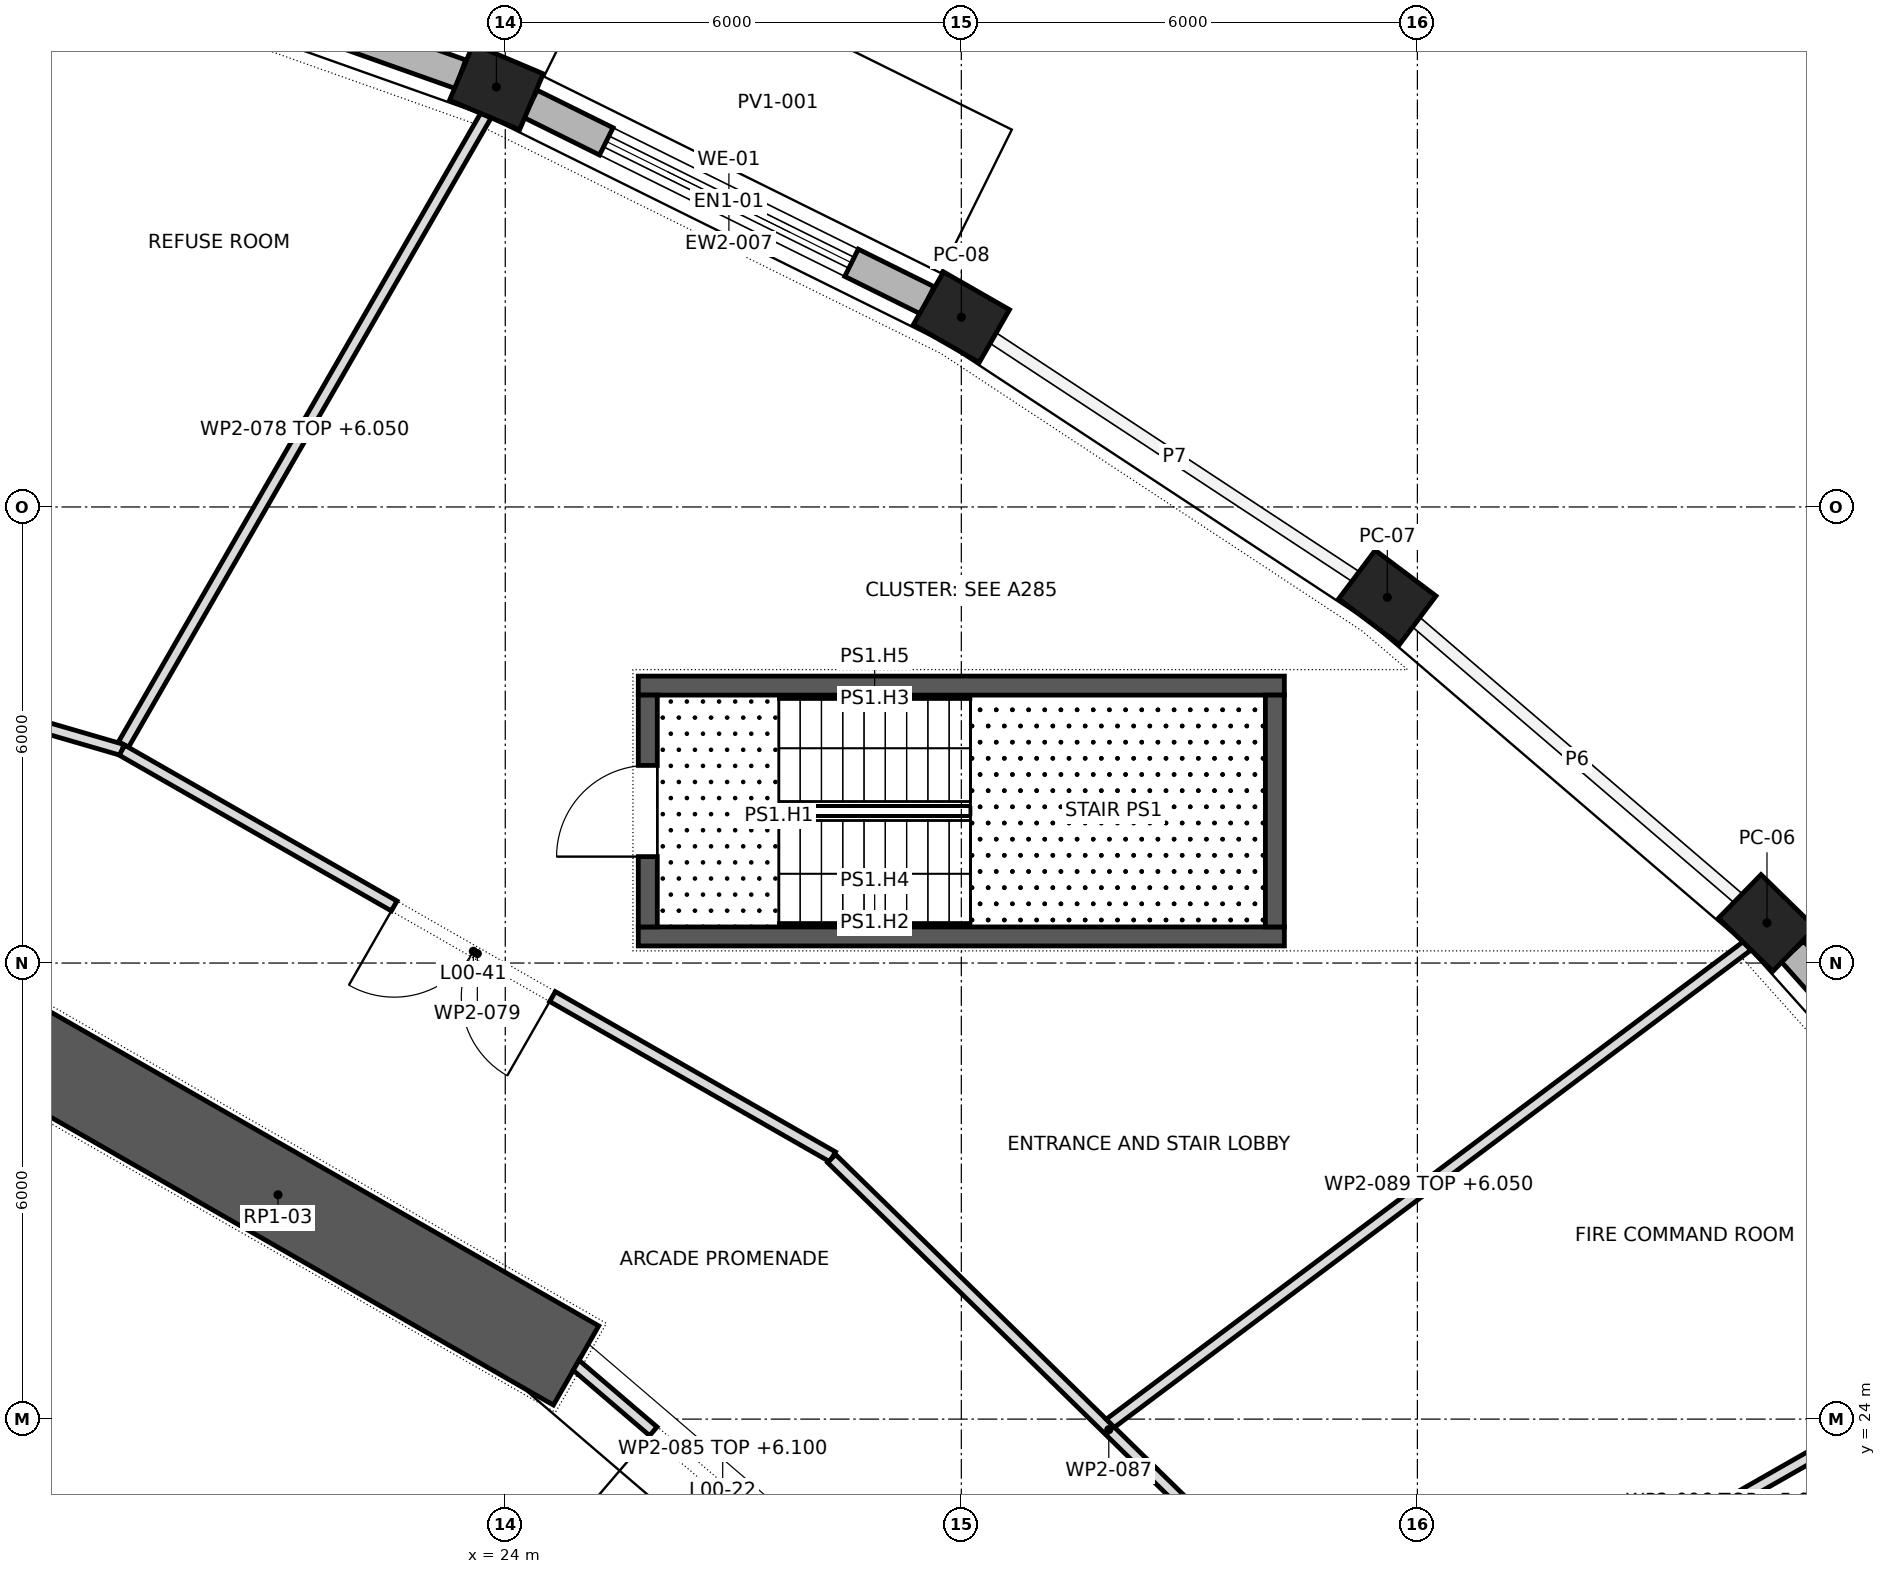
"""IFC4 building model, lengths in metres.
Left out: names, types, materials, properties, quantities, classifications, styles, units other than length and angle.
Written with IfcOpenShell. Run it as: python <this file> out.ifc"""

import sys

from ifc_helpers import new_model, si_unit, direction, frame, frame_2d, origin, origin_2d, place, context, subcontext, project, spatial, polyline, rectangle, outline, extrude, element, fill, save


model = new_model("IFC4")
c1 = context("Model", 3, precision=1e-05, world=origin(), true_north=direction((0.0, 1.0)))
c2 = subcontext(c1, "Body", "Model", "MODEL_VIEW")
j1 = project(units=[si_unit("LENGTHUNIT", "METRE"), si_unit("PLANEANGLEUNIT", "RADIAN")], contexts=[c1])
p1 = place(None, origin())
s1 = spatial("IfcSite", under=j1, at=p1, CompositionType="ELEMENT")
p2 = place(p1, origin())
s2 = spatial("IfcBuilding", under=s1, at=p2, CompositionType="ELEMENT")
p3 = place(p2, origin())
s3 = spatial("IfcBuildingStorey", under=s2, at=p3, CompositionType="ELEMENT", Elevation=0.0)
for number, where, z_axis, x_axis in (
    (1, (40.599, 30.528, 0.0), (0.0, 0.0, 1.0), (-0.715, 0.699, 0.0)),
    (2, (35.605, 34.81, 0.0), (0.0, 0.0, 1.0), (-0.799, 0.601, 0.0)),
    (3, (30.001, 38.497, 0.0), (0.0, 0.0, 1.0), (-0.868, 0.497, 0.0)),
    (4, (23.884, 41.525, 0.0), (0.0, 0.0, 1.0), (-0.921, 0.389, 0.0)),
):
    element("IfcColumn", number, at=place(p3, frame(where, z_axis=z_axis, x_axis=x_axis)), inside=s3, PredefinedType="COLUMN", context=c2, shape_type="SweptSolid", body=[
        extrude(rectangle(XDim=1.0, YDim=0.8, at=origin_2d()), origin(), (0.0, 0.0, 1.0), 7.0),
    ])
p4 = place(p3, frame((24.931, 24.706, 0.0), z_axis=(0.0, 0.0, 1.0), x_axis=(-0.867760656864, 0.496982336103, 0.0)))
e5 = element("IfcWall", 5, at=p4, inside=s3, PredefinedType="SHEAR", context=c2, shape_type="SweptSolid", body=[
    extrude(rectangle(XDim=9.038, YDim=1.2, at=frame_2d((4.519, 0.0))), origin(), (0.0, 0.0, 1.0), 7.0),
])
p5 = place(p3, frame((44.566, 26.095, 0.0), z_axis=(0.0, 0.0, 1.0), x_axis=(-0.666902265084, 0.745145199827, 0.0)))
e6 = element("IfcWall", 6, at=p5, inside=s3, PredefinedType="STANDARD", context=c2, shape_type="SweptSolid", body=[
    extrude(rectangle(XDim=5.448, YDim=0.4, at=frame_2d((2.724, 0.0))), origin(), (0.0, 0.0, 1.0), 6.2),
])
p6 = place(p5, frame((2.124, 0.0, 0.0)))
e7 = element("IfcOpeningElement", 7, at=p6, cuts=e6, PredefinedType="OPENING", context=c2, shape_type="SweptSolid", body=[
    extrude(rectangle(XDim=1.2, YDim=2.4, at=frame_2d((0.6, 1.2))), frame((0.0, 0.212, 0.0), z_axis=(0.0, -1.0, 0.0), x_axis=(1.0, 0.0, 0.0)), (0.0, 0.0, 1.0), 0.424),
])
p7 = place(p3, frame((29.553, 38.719, 0.0), z_axis=(0.0, 0.0, 1.0), x_axis=(-0.896188687727, 0.443673118399, 0.0)))
e8 = element("IfcWall", 8, at=p7, inside=s3, PredefinedType="STANDARD", context=c2, shape_type="SweptSolid", body=[
    extrude(rectangle(XDim=5.826, YDim=0.4, at=frame_2d((2.913, 0.0))), origin(), (0.0, 0.0, 1.0), 6.2),
])
p8 = place(p7, frame((1.113, 0.0, 0.0)))
e9 = element("IfcOpeningElement", 9, at=p8, cuts=e8, PredefinedType="OPENING", context=c2, shape_type="SweptSolid", body=[
    extrude(rectangle(XDim=3.6, YDim=3.0, at=frame_2d((1.8, 1.5))), frame((0.0, 0.212, 0.0), z_axis=(0.0, -1.0, 0.0), x_axis=(1.0, 0.0, 0.0)), (0.0, 0.0, 1.0), 0.424),
])
p9 = place(p7, frame((1.113, 0.0, 3.45)))
e10 = element("IfcOpeningElement", 10, at=p9, cuts=e8, PredefinedType="OPENING", context=c2, shape_type="SweptSolid", body=[
    extrude(rectangle(XDim=3.6, YDim=2.25, at=frame_2d((1.8, 1.125))), frame((0.0, 0.212, 0.0), z_axis=(0.0, -1.0, 0.0), x_axis=(1.0, 0.0, 0.0)), (0.0, 0.0, 1.0), 0.424),
])
p10 = place(p3, frame((23.412, 41.692, 0.0), z_axis=(0.0, 0.0, 1.0), x_axis=(-0.942325911458, 0.334696693431, 0.0)))
e11 = element("IfcWall", 11, at=p10, inside=s3, PredefinedType="STANDARD", context=c2, shape_type="SweptSolid", body=[
    extrude(rectangle(XDim=5.925, YDim=0.4, at=frame_2d((2.963, 0.0))), origin(), (0.0, 0.0, 1.0), 6.2),
])
p11 = place(p10, frame((2.363, 0.0, 0.0)))
e12 = element("IfcOpeningElement", 12, at=p11, cuts=e11, PredefinedType="OPENING", context=c2, shape_type="SweptSolid", body=[
    extrude(rectangle(XDim=1.2, YDim=2.4, at=frame_2d((0.6, 1.2))), frame((0.0, 0.212, 0.0), z_axis=(0.0, -1.0, 0.0), x_axis=(1.0, 0.0, 0.0)), (0.0, 0.0, 1.0), 0.424),
])
for number, where, z_axis, x_axis in (
    (13, (25.75, 33.65, 0.0), (0.0, 0.0, 1.0), (1.0, 0.0, 0.0)),
    (14, (25.75, 30.35, 0.0), (0.0, 0.0, 1.0), (1.0, 0.0, 0.0)),
):
    element("IfcWall", number, at=place(p3, frame(where, z_axis=z_axis, x_axis=x_axis)), inside=s3, PredefinedType="SHEAR", context=c2, shape_type="SweptSolid", body=[
        extrude(rectangle(XDim=8.5, YDim=0.25, at=frame_2d((4.25, 0.0))), origin(), (0.0, 0.0, 1.0), 6.65),
    ])
p12 = place(p3, frame((25.875, 30.475, 0.0), z_axis=(0.0, 0.0, 1.0), x_axis=(0.0, 1.0, 0.0)))
e15 = element("IfcWall", 15, at=p12, inside=s3, PredefinedType="SHEAR", context=c2, shape_type="SweptSolid", body=[
    extrude(rectangle(XDim=3.05, YDim=0.25, at=frame_2d((1.525, 0.0))), origin(), (0.0, 0.0, 1.0), 6.65),
])
p13 = place(p12, frame((0.925, 0.0, 0.0)))
e16 = element("IfcOpeningElement", 16, at=p13, cuts=e15, PredefinedType="OPENING", context=c2, shape_type="SweptSolid", body=[
    extrude(rectangle(XDim=1.2, YDim=2.1, at=frame_2d((0.6, 1.05))), frame((0.0, 0.137, 0.0), z_axis=(0.0, -1.0, 0.0), x_axis=(1.0, 0.0, 0.0)), (0.0, 0.0, 1.0), 0.274),
])
p14 = place(p3, frame((34.125, 30.475, 0.0), z_axis=(0.0, 0.0, 1.0), x_axis=(0.0, 1.0, 0.0)))
e17 = element("IfcWall", 17, at=p14, inside=s3, PredefinedType="SHEAR", context=c2, shape_type="SweptSolid", body=[
    extrude(rectangle(XDim=3.05, YDim=0.25, at=frame_2d((1.525, 0.0))), origin(), (0.0, 0.0, 1.0), 6.65),
])
p15 = place(p3, frame((8.446, 35.862, 0.0), z_axis=(0.0, 0.0, 1.0), x_axis=(0.96020899529, -0.27928244729, 0.0)))
e18 = element("IfcWall", 18, at=p15, inside=s3, PredefinedType="PARTITIONING", context=c2, shape_type="SweptSolid", body=[
    extrude(rectangle(XDim=10.95, YDim=0.15, at=frame_2d((5.475, 0.0))), origin(), (0.0, 0.0, 1.0), 6.65),
])
p16 = place(p15, frame((7.655, 0.0, 0.0)))
e19 = element("IfcOpeningElement", 19, at=p16, cuts=e18, PredefinedType="OPENING", context=c2, shape_type="SweptSolid", body=[
    extrude(rectangle(XDim=1.0, YDim=2.1, at=frame_2d((0.5, 1.05))), frame((0.0, 0.087, 0.0), z_axis=(0.0, -1.0, 0.0), x_axis=(1.0, 0.0, 0.0)), (0.0, 0.0, 1.0), 0.174),
])
p17 = place(p3, frame((18.978, 32.876, 0.0), z_axis=(0.0, 0.0, 1.0), x_axis=(0.499216965882, 0.866477016992, 0.0)))
e20 = element("IfcWall", 20, at=p17, inside=s3, PredefinedType="PARTITIONING", context=c2, shape_type="SweptSolid", body=[
    extrude(outline(polyline([(0.0, -0.075), (9.558, -0.075), (9.539, 0.075), (0.0, 0.075), (0.0, -0.075)])), origin(), (0.0, 0.0, 1.0), 6.05),
])
p18 = place(p3, frame((18.958, 32.8, 0.0), z_axis=(0.0, 0.0, 1.0), x_axis=(0.867958465669, -0.496636790697, 0.0)))
e21 = element("IfcWall", 21, at=p18, inside=s3, PredefinedType="PARTITIONING", context=c2, shape_type="SweptSolid", body=[
    extrude(rectangle(XDim=10.772, YDim=0.15, at=frame_2d((5.386, 0.0))), origin(), (0.0, 0.0, 1.0), 6.65),
])
p19 = place(p18, frame((4.125, 0.0, 0.0)))
e22 = element("IfcOpeningElement", 22, at=p19, cuts=e21, PredefinedType="OPENING", context=c2, shape_type="SweptSolid", body=[
    extrude(rectangle(XDim=2.4, YDim=2.1, at=frame_2d((1.2, 1.05))), frame((0.0, 0.087, 0.0), z_axis=(0.0, -1.0, 0.0), x_axis=(1.0, 0.0, 0.0)), (0.0, 0.0, 1.0), 0.174),
])
p20 = place(p3, frame((24.932, 24.708, 0.0), z_axis=(0.0, 0.0, 1.0), x_axis=(0.760084552743, -0.649824185978, 0.0)))
e23 = element("IfcWall", 23, at=p20, inside=s3, PredefinedType="PARTITIONING", context=c2, shape_type="SweptSolid", body=[
    extrude(outline(polyline([(0.014, -0.075), (5.06, -0.075), (5.09, 0.075), (-0.014, 0.075), (0.014, -0.075)])), origin(), (0.0, 0.0, 1.0), 6.1),
])
p21 = place(p20, frame((1.337, 0.0, 0.0)))
e24 = element("IfcOpeningElement", 24, at=p21, cuts=e23, PredefinedType="OPENING", context=c2, shape_type="SweptSolid", body=[
    extrude(rectangle(XDim=2.4, YDim=2.1, at=frame_2d((1.2, 1.05))), frame((0.0, 0.087, 0.0), z_axis=(0.0, -1.0, 0.0), x_axis=(1.0, 0.0, 0.0)), (0.0, 0.0, 1.0), 0.174),
])
p22 = place(p3, frame((28.294, 27.428, 0.0), z_axis=(0.0, 0.0, 1.0), x_axis=(0.714841567175, -0.6992864462, 0.0)))
e25 = element("IfcWall", 25, at=p22, inside=s3, PredefinedType="PARTITIONING", context=c2, shape_type="SweptSolid", body=[
    extrude(rectangle(XDim=10.202, YDim=0.15, at=frame_2d((5.101, 0.0))), origin(), (0.0, 0.0, 1.0), 6.65),
])
p23 = place(p22, frame((7.097, 0.0, 0.0)))
e26 = element("IfcOpeningElement", 26, at=p23, cuts=e25, PredefinedType="OPENING", context=c2, shape_type="SweptSolid", body=[
    extrude(rectangle(XDim=1.0, YDim=2.1, at=frame_2d((0.5, 1.05))), frame((0.0, 0.087, 0.0), z_axis=(0.0, -1.0, 0.0), x_axis=(1.0, 0.0, 0.0)), (0.0, 0.0, 1.0), 0.174),
])
p24 = place(p3, frame((31.96, 23.945, 0.0), z_axis=(0.0, 0.0, 1.0), x_axis=(0.800117504973, 0.599843294732, 0.0)))
e27 = element("IfcWall", 27, at=p24, inside=s3, PredefinedType="PARTITIONING", context=c2, shape_type="SweptSolid", body=[
    extrude(outline(polyline([(0.011, -0.075), (10.482, -0.075), (10.459, 0.075), (-0.011, 0.075), (0.011, -0.075)])), origin(), (0.0, 0.0, 1.0), 6.05),
])
p25 = place(p3, frame((35.637, 20.348, 0.0), z_axis=(0.0, 0.0, 1.0), x_axis=(0.868596802664, 0.495519519698, 0.0)))
e28 = element("IfcWall", 28, at=p25, inside=s3, PredefinedType="PARTITIONING", context=c2, shape_type="SweptSolid", body=[
    extrude(outline(polyline([(0.0, -0.075), (10.327, -0.075), (10.306, 0.075), (0.0, 0.075), (0.0, -0.075)])), origin(), (0.0, 0.0, 1.0), 5.897),
])
p26 = place(p8, frame((3.6, 0.0, 0.0), z_axis=(0.0, 0.0, 1.0), x_axis=(-1.0, 0.0, 0.0)))
e29 = element("IfcDoor", 29, at=p26, inside=s3, OperationType="DOUBLE_DOOR_SLIDING", PredefinedType="DOOR", context=c2, shape_type="SweptSolid", body=[
    extrude(rectangle(XDim=3.6, YDim=3.0, at=frame_2d((1.8, 1.5))), frame((0.0, 0.025, 0.0), z_axis=(0.0, -1.0, 0.0), x_axis=(1.0, 0.0, 0.0)), (0.0, 0.0, 1.0), 0.05),
])
fill(e9, e29)
p27 = place(p9, origin())
e30 = element("IfcWindow", 30, at=p27, inside=s3, PartitioningType="TRIPLE_PANEL_VERTICAL", PredefinedType="WINDOW", context=c2, shape_type="SweptSolid", body=[
    extrude(rectangle(XDim=3.6, YDim=2.25, at=frame_2d((1.8, 1.125))), frame((0.0, 0.03, 0.0), z_axis=(0.0, -1.0, 0.0), x_axis=(1.0, 0.0, 0.0)), (0.0, 0.0, 1.0), 0.06),
])
fill(e10, e30)
p28 = place(p13, origin())
e31 = element("IfcDoor", 31, at=p28, inside=s3, OperationType="SINGLE_SWING_RIGHT", PredefinedType="DOOR", context=c2, shape_type="SweptSolid", body=[
    extrude(rectangle(XDim=1.2, YDim=2.1, at=frame_2d((0.6, 1.05))), frame((0.0, 0.025, 0.0), z_axis=(0.0, -1.0, 0.0), x_axis=(1.0, 0.0, 0.0)), (0.0, 0.0, 1.0), 0.05),
])
fill(e16, e31)
p29 = place(p21, frame((2.4, 0.0, 0.0), z_axis=(0.0, 0.0, 1.0), x_axis=(-1.0, 0.0, 0.0)))
e32 = element("IfcDoor", 32, at=p29, inside=s3, OperationType="DOUBLE_DOOR_SINGLE_SWING", PredefinedType="DOOR", context=c2, shape_type="SweptSolid", body=[
    extrude(rectangle(XDim=2.4, YDim=2.1, at=frame_2d((1.2, 1.05))), frame((0.0, 0.025, 0.0), z_axis=(0.0, -1.0, 0.0), x_axis=(1.0, 0.0, 0.0)), (0.0, 0.0, 1.0), 0.05),
])
fill(e24, e32)
p30 = place(p19, frame((2.4, 0.0, 0.0), z_axis=(0.0, 0.0, 1.0), x_axis=(-1.0, 0.0, 0.0)))
e33 = element("IfcDoor", 33, at=p30, inside=s3, OperationType="DOUBLE_DOOR_SINGLE_SWING", PredefinedType="DOOR", context=c2, shape_type="SweptSolid", body=[
    extrude(rectangle(XDim=2.4, YDim=2.1, at=frame_2d((1.2, 1.05))), frame((0.0, 0.025, 0.0), z_axis=(0.0, -1.0, 0.0), x_axis=(1.0, 0.0, 0.0)), (0.0, 0.0, 1.0), 0.05),
])
fill(e22, e33)
save(model, sys.argv[1])
